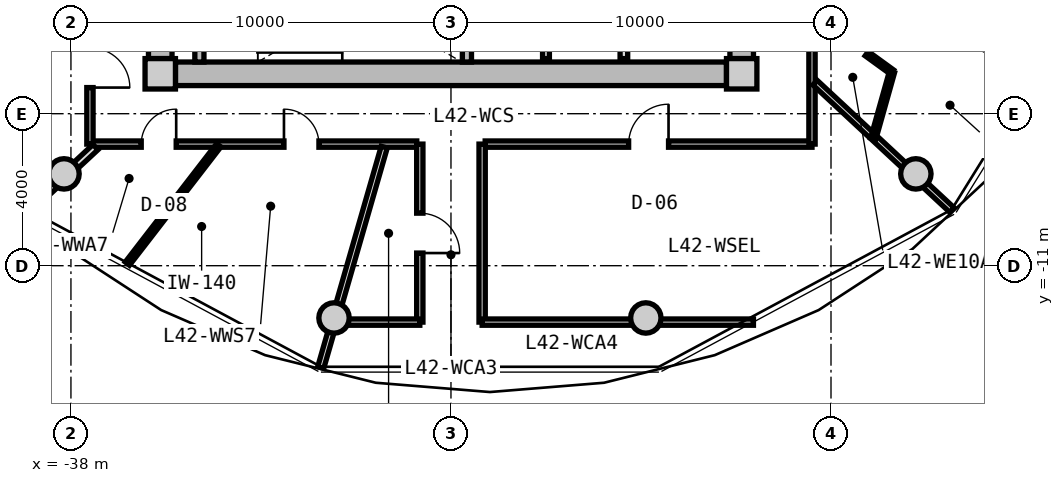
"""IFC4 building model, lengths in metres.
Left out: names, types, materials, properties, quantities, classifications, styles, units other than length and angle.
Written with IfcOpenShell. Run it as: python <this file> out.ifc"""

import sys

from ifc_helpers import new_model, si_unit, direction, frame, frame_2d, origin, origin_2d, place, context, subcontext, project, spatial, rectangle, circle, extrude, source, transform, mapped, element, fill, save


model = new_model("IFC4")
c1 = context("Model", 3, precision=1e-05, world=origin(), true_north=direction((0.0, 1.0)))
c2 = subcontext(c1, "Body", "Model", "MODEL_VIEW")
j1 = project(units=[si_unit("LENGTHUNIT", "METRE"), si_unit("PLANEANGLEUNIT", "RADIAN")], contexts=[c1])
p1 = place(None, origin())
s1 = spatial("IfcSite", under=j1, at=p1, CompositionType="ELEMENT")
p2 = place(p1, origin())
s2 = spatial("IfcBuilding", under=s1, at=p2, CompositionType="ELEMENT")
p3 = place(p2, frame((0.0, 0.0, 137.35)))
s3 = spatial("IfcBuildingStorey", under=s2, at=p3, CompositionType="ELEMENT", Elevation=137.35)
m1 = source(origin(), c2, "Body", "SweptSolid", [
    extrude(rectangle(XDim=0.8, YDim=0.8, at=origin_2d()), origin(), (0.0, 0.0, 1.0), 3.05),
])
for number, where, z_axis, x_axis in (
    (1, (-35.65, -5.95, 0.0), (0.0, 0.0, 1.0), (1.0, 0.0, 0.0)),
    (2, (-20.35, -5.95, 0.0), (0.0, 0.0, 1.0), (1.0, 0.0, 0.0)),
):
    element("IfcColumn", number, at=place(p3, frame(where, z_axis=z_axis, x_axis=x_axis)), inside=s3, PredefinedType="COLUMN", context=c2, shape_type="MappedRepresentation", body=[
        mapped(m1, transform((0.0, 0.0, 0.0), x_axis=(1.0, 0.0, 0.0), y_axis=(0.0, 1.0, 0.0), z_axis=(0.0, 0.0, 1.0), scale=1.0)),
    ])
m2 = source(origin(), c2, "Body", "SweptSolid", [
    extrude(rectangle(XDim=14.5, YDim=0.62, at=frame_2d((7.25, 0.0))), origin(), (0.0, 0.0, 1.0), 2.81),
])
p4 = place(p3, frame((-20.75, -5.95, 0.0), z_axis=(0.0, 0.0, 1.0), x_axis=(-1.0, 0.0, 0.0)))
e3 = element("IfcWall", 3, at=p4, inside=s3, PredefinedType="SHEAR", context=c2, shape_type="MappedRepresentation", body=[
    mapped(m2, transform((0.0, 0.0, 0.0), x_axis=(1.0, 0.0, 0.0), y_axis=(0.0, 1.0, 0.0), z_axis=(0.0, 0.0, 1.0), scale=1.0)),
])
m3 = source(origin(), c2, "Body", "SweptSolid", [
    extrude(rectangle(XDim=11.1, YDim=0.62, at=frame_2d((5.55, 0.0))), origin(), (0.0, 0.0, 1.0), 2.81),
])
p5 = place(p3, frame((-35.65, -5.55, 0.0), z_axis=(0.0, 0.0, 1.0), x_axis=(0.0, 1.0, 0.0)))
e4 = element("IfcWall", 4, at=p5, inside=s3, PredefinedType="SHEAR", context=c2, shape_type="MappedRepresentation", body=[
    mapped(m3, transform((0.0, 0.0, 0.0), x_axis=(1.0, 0.0, 0.0), y_axis=(0.0, 1.0, 0.0), z_axis=(0.0, 0.0, 1.0), scale=1.0)),
])
p6 = place(p5, frame((3.8, 0.0, 0.0)))
e5 = element("IfcOpeningElement", 5, at=p6, cuts=e4, PredefinedType="OPENING", context=c2, shape_type="SweptSolid", body=[
    extrude(rectangle(XDim=1.2, YDim=2.15, at=frame_2d((0.6, 1.075))), frame((0.0, 0.32, 0.0), z_axis=(0.0, -1.0, 0.0), x_axis=(1.0, 0.0, 0.0)), (0.0, 0.0, 1.0), 0.64),
])
p7 = place(p3, frame((-20.35, 5.55, 0.0), z_axis=(0.0, 0.0, 1.0), x_axis=(0.0, -1.0, 0.0)))
e6 = element("IfcWall", 6, at=p7, inside=s3, PredefinedType="SHEAR", context=c2, shape_type="MappedRepresentation", body=[
    mapped(m3, transform((0.0, 0.0, 0.0), x_axis=(1.0, 0.0, 0.0), y_axis=(0.0, 1.0, 0.0), z_axis=(0.0, 0.0, 1.0), scale=1.0)),
])
p8 = place(p7, frame((5.65, 0.0, 0.0)))
e7 = element("IfcOpeningElement", 7, at=p8, cuts=e6, PredefinedType="OPENING", context=c2, shape_type="SweptSolid", body=[
    extrude(rectangle(XDim=1.2, YDim=2.15, at=frame_2d((0.6, 1.075))), frame((0.0, 0.32, 0.0), z_axis=(0.0, -1.0, 0.0), x_axis=(1.0, 0.0, 0.0)), (0.0, 0.0, 1.0), 0.64),
])
m4 = source(origin(), c2, "Body", "SweptSolid", [
    extrude(circle(Radius=0.4, at=origin_2d()), origin(), (0.0, 0.0, 1.0), 3.05),
])
for number, where, z_axis, x_axis in (
    (8, (-38.183, -8.584, 0.0), (0.0, 0.0, 1.0), (1.0, 0.0, 0.0)),
    (9, (-31.077, -12.375, 0.0), (0.0, 0.0, 1.0), (1.0, 0.0, 0.0)),
    (10, (-22.873, -12.375, 0.0), (0.0, 0.0, 1.0), (1.0, 0.0, 0.0)),
    (11, (-15.767, -8.584, 0.0), (0.0, 0.0, 1.0), (1.0, 0.0, 0.0)),
):
    element("IfcColumn", number, at=place(p3, frame(where, z_axis=z_axis, x_axis=x_axis)), inside=s3, PredefinedType="COLUMN", context=c2, shape_type="MappedRepresentation", body=[
        mapped(m4, transform((0.0, 0.0, 0.0), x_axis=(1.0, 0.0, 0.0), y_axis=(0.0, 1.0, 0.0), z_axis=(0.0, 0.0, 1.0), scale=1.0)),
    ])
m5 = source(origin(), c2, "Body", "SweptSolid", [
    extrude(rectangle(XDim=3.19, YDim=0.24, at=frame_2d((1.595, 0.0))), origin(), (0.0, 0.0, 1.0), 2.81),
])
for number, where, z_axis, x_axis in (
    (12, (-34.62, -5.64, 0.0), (0.0, 0.0, 1.0), (0.0, 1.0, 0.0)),
    (13, (-27.58, -5.64, 0.0), (0.0, 0.0, 1.0), (0.0, 1.0, 0.0)),
):
    element("IfcWall", number, at=place(p3, frame(where, z_axis=z_axis, x_axis=x_axis)), inside=s3, PredefinedType="PARTITIONING", context=c2, shape_type="MappedRepresentation", body=[
        mapped(m5, transform((0.0, 0.0, 0.0), x_axis=(1.0, 0.0, 0.0), y_axis=(0.0, 1.0, 0.0), z_axis=(0.0, 0.0, 1.0), scale=1.0)),
    ])
m6 = source(origin(), c2, "Body", "SweptSolid", [
    extrude(rectangle(XDim=3.8, YDim=0.2, at=frame_2d((1.9, 0.0))), origin(), (0.0, 0.0, 1.0), 2.795),
])
p9 = place(p3, frame((-23.45, -5.55, 0.0), z_axis=(0.0, 0.0, 1.0), x_axis=(0.0, 1.0, 0.0)))
e14 = element("IfcWall", 14, at=p9, inside=s3, PredefinedType="PARTITIONING", context=c2, shape_type="MappedRepresentation", body=[
    mapped(m6, transform((0.0, 0.0, 0.0), x_axis=(1.0, 0.0, 0.0), y_axis=(0.0, 1.0, 0.0), z_axis=(0.0, 0.0, 1.0), scale=1.0)),
])
m7 = source(origin(), c2, "Body", "SweptSolid", [
    extrude(rectangle(XDim=3.22, YDim=0.18, at=frame_2d((1.61, 0.0))), origin(), (0.0, 0.0, 1.0), 2.795),
])
p10 = place(p3, frame((-25.5, -5.55, 0.0), z_axis=(0.0, 0.0, 1.0), x_axis=(0.0, 1.0, 0.0)))
e15 = element("IfcWall", 15, at=p10, inside=s3, PredefinedType="PARTITIONING", context=c2, shape_type="MappedRepresentation", body=[
    mapped(m7, transform((0.0, 0.0, 0.0), x_axis=(1.0, 0.0, 0.0), y_axis=(0.0, 1.0, 0.0), z_axis=(0.0, 0.0, 1.0), scale=1.0)),
])
m8 = source(origin(), c2, "Body", "SweptSolid", [
    extrude(rectangle(XDim=8.6, YDim=0.165, at=frame_2d((4.3, 0.0))), origin(), (0.0, 0.0, 1.0), 2.795),
])
p11 = place(p3, frame((-18.5, -7.8, 0.0), z_axis=(0.0, 0.0, 1.0), x_axis=(-1.0, 0.0, 0.0)))
e16 = element("IfcWall", 16, at=p11, inside=s3, PredefinedType="PARTITIONING", context=c2, shape_type="MappedRepresentation", body=[
    mapped(m8, transform((0.0, 0.0, 0.0), x_axis=(1.0, 0.0, 0.0), y_axis=(0.0, 1.0, 0.0), z_axis=(0.0, 0.0, 1.0), scale=1.0)),
])
p12 = place(p11, frame((3.775, 0.0, 0.0)))
e17 = element("IfcOpeningElement", 17, at=p12, cuts=e16, PredefinedType="OPENING", context=c2, shape_type="SweptSolid", body=[
    extrude(rectangle(XDim=1.05, YDim=2.15, at=frame_2d((0.525, 1.075))), frame((0.0, 0.093, 0.0), z_axis=(0.0, -1.0, 0.0), x_axis=(1.0, 0.0, 0.0)), (0.0, 0.0, 1.0), 0.185),
])
p13 = place(p3, frame((-28.9, -7.8, 0.0), z_axis=(0.0, 0.0, 1.0), x_axis=(-1.0, 0.0, 0.0)))
e18 = element("IfcWall", 18, at=p13, inside=s3, PredefinedType="PARTITIONING", context=c2, shape_type="MappedRepresentation", body=[
    mapped(m8, transform((0.0, 0.0, 0.0), x_axis=(1.0, 0.0, 0.0), y_axis=(0.0, 1.0, 0.0), z_axis=(0.0, 0.0, 1.0), scale=1.0)),
])
p14 = place(p13, frame((6.33, 0.0, 0.0)))
e19 = element("IfcOpeningElement", 19, at=p14, cuts=e18, PredefinedType="OPENING", context=c2, shape_type="SweptSolid", body=[
    extrude(rectangle(XDim=0.92, YDim=2.1, at=frame_2d((0.46, 1.05))), frame((0.0, 0.093, 0.0), z_axis=(0.0, -1.0, 0.0), x_axis=(1.0, 0.0, 0.0)), (0.0, 0.0, 1.0), 0.185),
])
p15 = place(p13, frame((2.575, 0.0, 0.0)))
e20 = element("IfcOpeningElement", 20, at=p15, cuts=e18, PredefinedType="OPENING", context=c2, shape_type="SweptSolid", body=[
    extrude(rectangle(XDim=0.92, YDim=2.1, at=frame_2d((0.46, 1.05))), frame((0.0, 0.093, 0.0), z_axis=(0.0, -1.0, 0.0), x_axis=(1.0, 0.0, 0.0)), (0.0, 0.0, 1.0), 0.185),
])
m9 = source(origin(), c2, "Body", "SweptSolid", [
    extrude(rectangle(XDim=15.6, YDim=0.165, at=frame_2d((7.8, 0.0))), origin(), (0.0, 0.0, 1.0), 2.795),
])
p16 = place(p3, frame((-37.5, -7.8, 0.0), z_axis=(0.0, 0.0, 1.0), x_axis=(0.0, 1.0, 0.0)))
e21 = element("IfcWall", 21, at=p16, inside=s3, PredefinedType="PARTITIONING", context=c2, shape_type="MappedRepresentation", body=[
    mapped(m9, transform((0.0, 0.0, 0.0), x_axis=(1.0, 0.0, 0.0), y_axis=(0.0, 1.0, 0.0), z_axis=(0.0, 0.0, 1.0), scale=1.0)),
])
p17 = place(p16, frame((8.95, 0.0, 0.0)))
e22 = element("IfcOpeningElement", 22, at=p17, cuts=e21, PredefinedType="OPENING", context=c2, shape_type="SweptSolid", body=[
    extrude(rectangle(XDim=1.25, YDim=2.2, at=frame_2d((0.625, 1.1))), frame((0.0, 0.093, 0.0), z_axis=(0.0, -1.0, 0.0), x_axis=(1.0, 0.0, 0.0)), (0.0, 0.0, 1.0), 0.185),
])
p18 = place(p16, frame((4.851, 0.0, 0.0)))
e23 = element("IfcOpeningElement", 23, at=p18, cuts=e21, PredefinedType="OPENING", context=c2, shape_type="SweptSolid", body=[
    extrude(rectangle(XDim=1.05, YDim=2.15, at=frame_2d((0.525, 1.075))), frame((0.0, 0.093, 0.0), z_axis=(0.0, -1.0, 0.0), x_axis=(1.0, 0.0, 0.0)), (0.0, 0.0, 1.0), 0.185),
])
p19 = place(p16, frame((1.488, 0.0, 0.0)))
e24 = element("IfcOpeningElement", 24, at=p19, cuts=e21, PredefinedType="OPENING", context=c2, shape_type="SweptSolid", body=[
    extrude(rectangle(XDim=1.05, YDim=2.15, at=frame_2d((0.525, 1.075))), frame((0.0, 0.093, 0.0), z_axis=(0.0, -1.0, 0.0), x_axis=(1.0, 0.0, 0.0)), (0.0, 0.0, 1.0), 0.185),
])
p20 = place(p3, frame((-18.5, 7.8, 0.0), z_axis=(0.0, 0.0, 1.0), x_axis=(0.0, -1.0, 0.0)))
e25 = element("IfcWall", 25, at=p20, inside=s3, PredefinedType="PARTITIONING", context=c2, shape_type="MappedRepresentation", body=[
    mapped(m9, transform((0.0, 0.0, 0.0), x_axis=(1.0, 0.0, 0.0), y_axis=(0.0, 1.0, 0.0), z_axis=(0.0, 0.0, 1.0), scale=1.0)),
])
p21 = place(p20, frame((10.881, 0.0, 0.0)))
e26 = element("IfcOpeningElement", 26, at=p21, cuts=e25, PredefinedType="OPENING", context=c2, shape_type="SweptSolid", body=[
    extrude(rectangle(XDim=1.05, YDim=2.15, at=frame_2d((0.525, 1.075))), frame((0.0, 0.093, 0.0), z_axis=(0.0, -1.0, 0.0), x_axis=(1.0, 0.0, 0.0)), (0.0, 0.0, 1.0), 0.185),
])
p22 = place(p20, frame((8.844, 0.0, 0.0)))
e27 = element("IfcOpeningElement", 27, at=p22, cuts=e25, PredefinedType="OPENING", context=c2, shape_type="SweptSolid", body=[
    extrude(rectangle(XDim=1.05, YDim=2.15, at=frame_2d((0.525, 1.075))), frame((0.0, 0.093, 0.0), z_axis=(0.0, -1.0, 0.0), x_axis=(1.0, 0.0, 0.0)), (0.0, 0.0, 1.0), 0.185),
])
p23 = place(p20, frame((3.596, 0.0, 0.0)))
e28 = element("IfcOpeningElement", 28, at=p23, cuts=e25, PredefinedType="OPENING", context=c2, shape_type="SweptSolid", body=[
    extrude(rectangle(XDim=1.25, YDim=2.2, at=frame_2d((0.625, 1.1))), frame((0.0, 0.093, 0.0), z_axis=(0.0, -1.0, 0.0), x_axis=(1.0, 0.0, 0.0)), (0.0, 0.0, 1.0), 0.185),
])
m10 = source(origin(), c2, "Body", "SweptSolid", [
    extrude(rectangle(XDim=6.035, YDim=0.165, at=frame_2d((3.018, 0.0))), origin(), (0.0, 0.0, 1.0), 2.345),
])
p24 = place(p3, frame((-29.756, -7.88, 0.0), z_axis=(0.0, 0.0, 1.0), x_axis=(-0.276809454862, -0.960924828329, 0.0)))
e29 = element("IfcWall", 29, at=p24, inside=s3, PredefinedType="PARTITIONING", context=c2, shape_type="MappedRepresentation", body=[
    mapped(m10, transform((0.0, 0.0, 0.0), x_axis=(1.0, 0.0, 0.0), y_axis=(0.0, 1.0, 0.0), z_axis=(0.0, 0.0, 1.0), scale=1.0)),
])
m11 = source(origin(), c2, "Body", "SweptSolid", [
    extrude(rectangle(XDim=4.927, YDim=0.165, at=frame_2d((2.463, 0.0))), origin(), (0.0, 0.0, 1.0), 2.345),
])
p25 = place(p3, frame((-18.42, -6.183, 0.0), z_axis=(0.0, 0.0, 1.0), x_axis=(0.732191335987, -0.681098999783, 0.0)))
e30 = element("IfcWall", 30, at=p25, inside=s3, PredefinedType="PARTITIONING", context=c2, shape_type="MappedRepresentation", body=[
    mapped(m11, transform((0.0, 0.0, 0.0), x_axis=(1.0, 0.0, 0.0), y_axis=(0.0, 1.0, 0.0), z_axis=(0.0, 0.0, 1.0), scale=1.0)),
])
m12 = source(origin(), c2, "Body", "SweptSolid", [
    extrude(rectangle(XDim=4.685, YDim=0.165, at=frame_2d((2.342, 0.0))), origin(), (0.0, 0.0, 1.0), 2.795),
])
p26 = place(p3, frame((-28.82, -12.485, 0.0), z_axis=(0.0, 0.0, 1.0), x_axis=(0.0, 1.0, 0.0)))
e31 = element("IfcWall", 31, at=p26, inside=s3, PredefinedType="PARTITIONING", context=c2, shape_type="MappedRepresentation", body=[
    mapped(m12, transform((0.0, 0.0, 0.0), x_axis=(1.0, 0.0, 0.0), y_axis=(0.0, 1.0, 0.0), z_axis=(0.0, 0.0, 1.0), scale=1.0)),
])
p27 = place(p26, frame((1.817, 0.0, 0.0)))
e32 = element("IfcOpeningElement", 32, at=p27, cuts=e31, PredefinedType="OPENING", context=c2, shape_type="SweptSolid", body=[
    extrude(rectangle(XDim=1.05, YDim=2.15, at=frame_2d((0.525, 1.075))), frame((0.0, 0.093, 0.0), z_axis=(0.0, -1.0, 0.0), x_axis=(1.0, 0.0, 0.0)), (0.0, 0.0, 1.0), 0.185),
])
m13 = source(origin(), c2, "Body", "SweptSolid", [
    extrude(rectangle(XDim=2.419, YDim=0.165, at=frame_2d((1.209, 0.0))), origin(), (0.0, 0.0, 1.0), 2.345),
])
p28 = place(p3, frame((-31.239, -12.485, 0.0), z_axis=(0.0, 0.0, 1.0), x_axis=(1.0, 0.0, 0.0)))
e33 = element("IfcWall", 33, at=p28, inside=s3, PredefinedType="PARTITIONING", context=c2, shape_type="MappedRepresentation", body=[
    mapped(m13, transform((0.0, 0.0, 0.0), x_axis=(1.0, 0.0, 0.0), y_axis=(0.0, 1.0, 0.0), z_axis=(0.0, 0.0, 1.0), scale=1.0)),
])
p29 = place(p3, frame((-27.18, -12.485, 0.0), z_axis=(0.0, 0.0, 1.0), x_axis=(0.0, 1.0, 0.0)))
e34 = element("IfcWall", 34, at=p29, inside=s3, PredefinedType="PARTITIONING", context=c2, shape_type="MappedRepresentation", body=[
    mapped(m12, transform((0.0, 0.0, 0.0), x_axis=(1.0, 0.0, 0.0), y_axis=(0.0, 1.0, 0.0), z_axis=(0.0, 0.0, 1.0), scale=1.0)),
])
m14 = source(origin(), c2, "Body", "SweptSolid", [
    extrude(rectangle(XDim=7.139, YDim=0.165, at=frame_2d((3.569, 0.0))), origin(), (0.0, 0.0, 1.0), 2.345),
])
p30 = place(p3, frame((-27.18, -12.485, 0.0), z_axis=(0.0, 0.0, 1.0), x_axis=(1.0, 0.0, 0.0)))
e35 = element("IfcWall", 35, at=p30, inside=s3, PredefinedType="PARTITIONING", context=c2, shape_type="MappedRepresentation", body=[
    mapped(m14, transform((0.0, 0.0, 0.0), x_axis=(1.0, 0.0, 0.0), y_axis=(0.0, 1.0, 0.0), z_axis=(0.0, 0.0, 1.0), scale=1.0)),
])
m15 = source(origin(), c2, "Body", "SweptSolid", [
    extrude(rectangle(XDim=2.435, YDim=0.19, at=frame_2d((1.217, 0.0))), origin(), (0.0, 0.0, 1.0), 2.345),
])
p31 = place(p3, frame((-37.354, -7.88, 0.0), z_axis=(0.0, 0.0, 1.0), x_axis=(-0.732164643118, -0.681127693878, 0.0)))
e36 = element("IfcWall", 36, at=p31, inside=s3, PredefinedType="PARTITIONING", context=c2, shape_type="MappedRepresentation", body=[
    mapped(m15, transform((0.0, 0.0, 0.0), x_axis=(1.0, 0.0, 0.0), y_axis=(0.0, 1.0, 0.0), z_axis=(0.0, 0.0, 1.0), scale=1.0)),
])
m16 = source(origin(), c2, "Body", "SweptSolid", [
    extrude(rectangle(XDim=4.335, YDim=0.19, at=frame_2d((2.168, 0.0))), origin(), (0.0, 0.0, 1.0), 2.795),
])
p32 = place(p3, frame((-37.53, -3.926, 0.0), z_axis=(0.0, 0.0, 1.0), x_axis=(-0.884108234352, -0.4672821738, 0.0)))
e37 = element("IfcWall", 37, at=p32, inside=s3, PredefinedType="PARTITIONING", context=c2, shape_type="MappedRepresentation", body=[
    mapped(m16, transform((0.0, 0.0, 0.0), x_axis=(1.0, 0.0, 0.0), y_axis=(0.0, 1.0, 0.0), z_axis=(0.0, 0.0, 1.0), scale=1.0)),
])
m17 = source(origin(), c2, "Body", "SweptSolid", [
    extrude(rectangle(XDim=3.937, YDim=0.14, at=frame_2d((1.968, 0.0))), origin(), (0.0, 0.0, 1.0), 2.795),
])
p33 = place(p3, frame((-34.11, -7.83, 0.0), z_axis=(0.0, 0.0, 1.0), x_axis=(-0.611016723561, -0.791617687731, 0.0)))
e38 = element("IfcWall", 38, at=p33, inside=s3, PredefinedType="PARTITIONING", context=c2, shape_type="MappedRepresentation", body=[
    mapped(m17, transform((0.0, 0.0, 0.0), x_axis=(1.0, 0.0, 0.0), y_axis=(0.0, 1.0, 0.0), z_axis=(0.0, 0.0, 1.0), scale=1.0)),
])
m18 = source(origin(), c2, "Body", "SweptSolid", [
    extrude(rectangle(XDim=6.499, YDim=0.19, at=frame_2d((3.25, 0.0))), origin(), (0.0, 0.0, 1.0), 2.795),
])
p34 = place(p3, frame((-18.324, -2.898, 0.0), z_axis=(0.0, 0.0, 1.0), x_axis=(0.882700013711, -0.469936895545, 0.0)))
e39 = element("IfcWall", 39, at=p34, inside=s3, PredefinedType="PARTITIONING", context=c2, shape_type="MappedRepresentation", body=[
    mapped(m18, transform((0.0, 0.0, 0.0), x_axis=(1.0, 0.0, 0.0), y_axis=(0.0, 1.0, 0.0), z_axis=(0.0, 0.0, 1.0), scale=1.0)),
])
m19 = source(origin(), c2, "Body", "SweptSolid", [
    extrude(rectangle(XDim=2.563, YDim=0.14, at=frame_2d((1.282, 0.0))), origin(), (0.0, 0.0, 1.0), 2.795),
])
p35 = place(p3, frame((-18.47, -4.397, 0.0), z_axis=(0.0, 0.0, 1.0), x_axis=(0.809308208957, -0.587384220859, 0.0)))
e40 = element("IfcWall", 40, at=p35, inside=s3, PredefinedType="PARTITIONING", context=c2, shape_type="MappedRepresentation", body=[
    mapped(m19, transform((0.0, 0.0, 0.0), x_axis=(1.0, 0.0, 0.0), y_axis=(0.0, 1.0, 0.0), z_axis=(0.0, 0.0, 1.0), scale=1.0)),
])
p36 = place(p35, frame((0.822, 0.0, 0.0)))
e41 = element("IfcOpeningElement", 41, at=p36, cuts=e40, PredefinedType="OPENING", context=c2, shape_type="SweptSolid", body=[
    extrude(rectangle(XDim=0.92, YDim=2.1, at=frame_2d((0.46, 1.05))), frame((0.0, 0.08, 0.0), z_axis=(0.0, -1.0, 0.0), x_axis=(1.0, 0.0, 0.0)), (0.0, 0.0, 1.0), 0.16),
])
m20 = source(origin(), c2, "Body", "SweptSolid", [
    extrude(rectangle(XDim=1.826, YDim=0.14, at=frame_2d((0.913, 0.0))), origin(), (0.0, 0.0, 1.0), 2.435),
])
p37 = place(p3, frame((-16.396, -5.903, 0.0), z_axis=(0.0, 0.0, 1.0), x_axis=(-0.270745576918, -0.962650940154, 0.0)))
e42 = element("IfcWall", 42, at=p37, inside=s3, PredefinedType="PARTITIONING", context=c2, shape_type="MappedRepresentation", body=[
    mapped(m20, transform((0.0, 0.0, 0.0), x_axis=(1.0, 0.0, 0.0), y_axis=(0.0, 1.0, 0.0), z_axis=(0.0, 0.0, 1.0), scale=1.0)),
])
m21 = source(origin(), c2, "Body", "SweptSolid", [
    extrude(rectangle(XDim=1.05, YDim=2.15, at=frame_2d((0.525, 1.075))), frame((0.0, 0.025, 0.0), z_axis=(0.0, -1.0, 0.0), x_axis=(1.0, 0.0, 0.0)), (0.0, 0.0, 1.0), 0.05),
])
p38 = place(p27, frame((1.05, 0.0, 0.0), z_axis=(0.0, 0.0, 1.0), x_axis=(-1.0, 0.0, 0.0)))
e43 = element("IfcDoor", 43, at=p38, inside=s3, OperationType="SINGLE_SWING_RIGHT", PredefinedType="DOOR", context=c2, shape_type="MappedRepresentation", body=[
    mapped(m21, transform((0.0, 0.0, 0.0), x_axis=(1.0, 0.0, 0.0), y_axis=(0.0, 1.0, 0.0), z_axis=(0.0, 0.0, 1.0), scale=1.0)),
])
fill(e32, e43)
p39 = place(p12, frame((1.05, 0.0, 0.0), z_axis=(0.0, 0.0, 1.0), x_axis=(-1.0, 0.0, 0.0)))
e44 = element("IfcDoor", 44, at=p39, inside=s3, OperationType="SINGLE_SWING_RIGHT", PredefinedType="DOOR", context=c2, shape_type="MappedRepresentation", body=[
    mapped(m21, transform((0.0, 0.0, 0.0), x_axis=(1.0, 0.0, 0.0), y_axis=(0.0, 1.0, 0.0), z_axis=(0.0, 0.0, 1.0), scale=1.0)),
])
fill(e17, e44)
p40 = place(p19, frame((1.05, 0.0, 0.0), z_axis=(0.0, 0.0, 1.0), x_axis=(-1.0, 0.0, 0.0)))
e45 = element("IfcDoor", 45, at=p40, inside=s3, OperationType="SINGLE_SWING_RIGHT", PredefinedType="DOOR", context=c2, shape_type="MappedRepresentation", body=[
    mapped(m21, transform((0.0, 0.0, 0.0), x_axis=(1.0, 0.0, 0.0), y_axis=(0.0, 1.0, 0.0), z_axis=(0.0, 0.0, 1.0), scale=1.0)),
])
fill(e24, e45)
m22 = source(origin(), c2, "Body", "SweptSolid", [
    extrude(rectangle(XDim=0.92, YDim=2.1, at=frame_2d((0.46, 1.05))), frame((0.0, 0.025, 0.0), z_axis=(0.0, -1.0, 0.0), x_axis=(1.0, 0.0, 0.0)), (0.0, 0.0, 1.0), 0.05),
])
p41 = place(p14, frame((0.92, 0.0, 0.0), z_axis=(0.0, 0.0, 1.0), x_axis=(-1.0, 0.0, 0.0)))
e46 = element("IfcDoor", 46, at=p41, inside=s3, OperationType="SINGLE_SWING_RIGHT", PredefinedType="DOOR", context=c2, shape_type="MappedRepresentation", body=[
    mapped(m22, transform((0.0, 0.0, 0.0), x_axis=(1.0, 0.0, 0.0), y_axis=(0.0, 1.0, 0.0), z_axis=(0.0, 0.0, 1.0), scale=1.0)),
])
fill(e19, e46)
p42 = place(p15, frame((0.92, 0.0, 0.0), z_axis=(0.0, 0.0, 1.0), x_axis=(-1.0, 0.0, 0.0)))
e47 = element("IfcDoor", 47, at=p42, inside=s3, OperationType="SINGLE_SWING_LEFT", PredefinedType="DOOR", context=c2, shape_type="MappedRepresentation", body=[
    mapped(m22, transform((0.0, 0.0, 0.0), x_axis=(1.0, 0.0, 0.0), y_axis=(0.0, 1.0, 0.0), z_axis=(0.0, 0.0, 1.0), scale=1.0)),
])
fill(e20, e47)
p43 = place(p36, origin())
e48 = element("IfcDoor", 48, at=p43, inside=s3, OperationType="SINGLE_SWING_RIGHT", PredefinedType="DOOR", context=c2, shape_type="MappedRepresentation", body=[
    mapped(m22, transform((0.0, 0.0, 0.0), x_axis=(1.0, 0.0, 0.0), y_axis=(0.0, 1.0, 0.0), z_axis=(0.0, 0.0, 1.0), scale=1.0)),
])
fill(e41, e48)
save(model, sys.argv[1])
